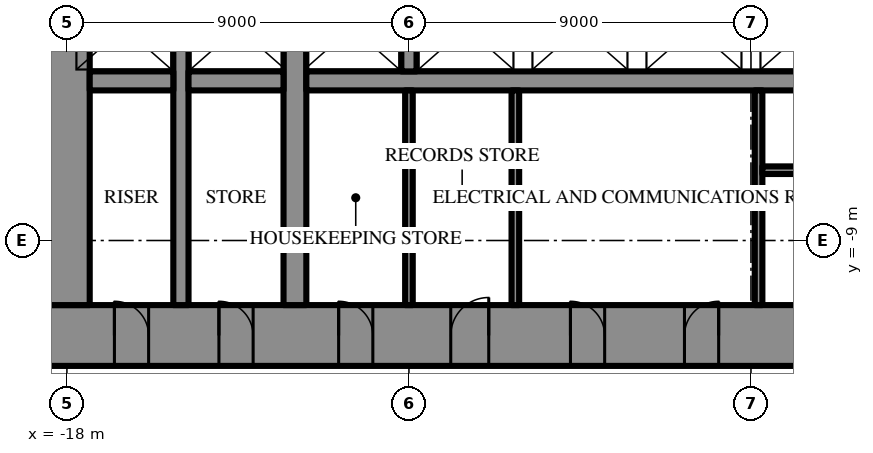
"""IFC4 building model, lengths in metres.
Left out: names, types, materials, properties, quantities, classifications, styles, units other than length and angle.
Written with IfcOpenShell. Run it as: python <this file> out.ifc"""

import sys

from ifc_helpers import new_model, si_unit, direction, frame, frame_2d, origin, place, context, subcontext, project, spatial, rectangle, extrude, element, fill, save


model = new_model("IFC4")
c1 = context("Model", 3, precision=1e-05, world=origin(), true_north=direction((0.0, 1.0)))
c2 = subcontext(c1, "Body", "Model", "MODEL_VIEW")
j1 = project(units=[si_unit("LENGTHUNIT", "METRE"), si_unit("PLANEANGLEUNIT", "RADIAN")], contexts=[c1])
p1 = place(None, origin())
s1 = spatial("IfcSite", under=j1, at=p1, CompositionType="ELEMENT")
p2 = place(p1, origin())
s2 = spatial("IfcBuilding", under=s1, at=p2, CompositionType="ELEMENT")
p3 = place(p2, frame((0.0, 0.0, 44.5)))
s3 = spatial("IfcBuildingStorey", under=s2, at=p3, CompositionType="ELEMENT", Elevation=44.5)
p4 = place(p3, frame((18.6, -11.5, 0.0), z_axis=(0.0, 0.0, 1.0), x_axis=(-1.0, 0.0, 0.0)))
e1 = element("IfcWall", 1, at=p4, inside=s3, PredefinedType="SHEAR", context=c2, shape_type="SweptSolid", body=[
    extrude(rectangle(XDim=37.2, YDim=1.6, at=frame_2d((18.6, 0.0))), origin(), (0.0, 0.0, 1.0), 4.2),
])
p5 = place(p4, frame((19.45, 0.0, 0.0)))
e2 = element("IfcOpeningElement", 2, at=p5, cuts=e1, PredefinedType="OPENING", context=c2, shape_type="SweptSolid", body=[
    extrude(rectangle(XDim=0.9, YDim=2.2, at=frame_2d((0.45, 1.1))), frame((0.0, 0.81, 0.0), z_axis=(0.0, -1.0, 0.0), x_axis=(1.0, 0.0, 0.0)), (0.0, 0.0, 1.0), 1.62),
])
p6 = place(p4, frame((22.45, 0.0, 0.0)))
e3 = element("IfcOpeningElement", 3, at=p6, cuts=e1, PredefinedType="OPENING", context=c2, shape_type="SweptSolid", body=[
    extrude(rectangle(XDim=0.9, YDim=2.2, at=frame_2d((0.45, 1.1))), frame((0.0, 0.81, 0.0), z_axis=(0.0, -1.0, 0.0), x_axis=(1.0, 0.0, 0.0)), (0.0, 0.0, 1.0), 1.62),
])
p7 = place(p4, frame((25.5, 0.0, 0.0)))
e4 = element("IfcOpeningElement", 4, at=p7, cuts=e1, PredefinedType="OPENING", context=c2, shape_type="SweptSolid", body=[
    extrude(rectangle(XDim=1.0, YDim=2.2, at=frame_2d((0.5, 1.1))), frame((0.0, 0.81, 0.0), z_axis=(0.0, -1.0, 0.0), x_axis=(1.0, 0.0, 0.0)), (0.0, 0.0, 1.0), 1.62),
])
p8 = place(p4, frame((1.85, 0.0, 0.0)))
e5 = element("IfcOpeningElement", 5, at=p8, cuts=e1, PredefinedType="OPENING", context=c2, shape_type="SweptSolid", body=[
    extrude(rectangle(XDim=0.9, YDim=2.2, at=frame_2d((0.45, 1.1))), frame((0.0, 0.81, 0.0), z_axis=(0.0, -1.0, 0.0), x_axis=(1.0, 0.0, 0.0)), (0.0, 0.0, 1.0), 1.62),
])
p9 = place(p4, frame((4.6, 0.0, 0.0)))
e6 = element("IfcOpeningElement", 6, at=p9, cuts=e1, PredefinedType="OPENING", context=c2, shape_type="SweptSolid", body=[
    extrude(rectangle(XDim=0.9, YDim=2.2, at=frame_2d((0.45, 1.1))), frame((0.0, 0.81, 0.0), z_axis=(0.0, -1.0, 0.0), x_axis=(1.0, 0.0, 0.0)), (0.0, 0.0, 1.0), 1.62),
])
p10 = place(p4, frame((7.75, 0.0, 0.0)))
e7 = element("IfcOpeningElement", 7, at=p10, cuts=e1, PredefinedType="OPENING", context=c2, shape_type="SweptSolid", body=[
    extrude(rectangle(XDim=0.9, YDim=2.2, at=frame_2d((0.45, 1.1))), frame((0.0, 0.81, 0.0), z_axis=(0.0, -1.0, 0.0), x_axis=(1.0, 0.0, 0.0)), (0.0, 0.0, 1.0), 1.62),
])
p11 = place(p4, frame((28.55, 0.0, 0.0)))
e8 = element("IfcOpeningElement", 8, at=p11, cuts=e1, PredefinedType="OPENING", context=c2, shape_type="SweptSolid", body=[
    extrude(rectangle(XDim=0.9, YDim=2.2, at=frame_2d((0.45, 1.1))), frame((0.0, 0.81, 0.0), z_axis=(0.0, -1.0, 0.0), x_axis=(1.0, 0.0, 0.0)), (0.0, 0.0, 1.0), 1.62),
])
p12 = place(p4, frame((31.7, 0.0, 0.0)))
e9 = element("IfcOpeningElement", 9, at=p12, cuts=e1, PredefinedType="OPENING", context=c2, shape_type="SweptSolid", body=[
    extrude(rectangle(XDim=0.9, YDim=2.2, at=frame_2d((0.45, 1.1))), frame((0.0, 0.81, 0.0), z_axis=(0.0, -1.0, 0.0), x_axis=(1.0, 0.0, 0.0)), (0.0, 0.0, 1.0), 1.62),
])
p13 = place(p4, frame((34.45, 0.0, 0.0)))
e10 = element("IfcOpeningElement", 10, at=p13, cuts=e1, PredefinedType="OPENING", context=c2, shape_type="SweptSolid", body=[
    extrude(rectangle(XDim=0.9, YDim=2.2, at=frame_2d((0.45, 1.1))), frame((0.0, 0.81, 0.0), z_axis=(0.0, -1.0, 0.0), x_axis=(1.0, 0.0, 0.0)), (0.0, 0.0, 1.0), 1.62),
])
p14 = place(p3, frame((-18.0, 10.7, 0.0), z_axis=(0.0, 0.0, 1.0), x_axis=(0.0, -1.0, 0.0)))
e11 = element("IfcWall", 11, at=p14, inside=s3, PredefinedType="SHEAR", context=c2, shape_type="SweptSolid", body=[
    extrude(rectangle(XDim=21.4, YDim=1.2, at=frame_2d((10.7, 0.0))), origin(), (0.0, 0.0, 1.0), 4.2),
])
p15 = place(p14, frame((9.8, 0.0, 0.0)))
e12 = element("IfcOpeningElement", 12, at=p15, cuts=e11, PredefinedType="OPENING", context=c2, shape_type="SweptSolid", body=[
    extrude(rectangle(XDim=1.8, YDim=2.4, at=frame_2d((0.9, 1.2))), frame((0.0, 0.61, 0.0), z_axis=(0.0, -1.0, 0.0), x_axis=(1.0, 0.0, 0.0)), (0.0, 0.0, 1.0), 1.22),
])
p16 = place(p3, frame((-12.0, -10.7, 0.0), z_axis=(0.0, 0.0, 1.0), x_axis=(0.0, 1.0, 0.0)))
e13 = element("IfcWall", 13, at=p16, inside=s3, PredefinedType="SHEAR", context=c2, shape_type="SweptSolid", body=[
    extrude(rectangle(XDim=21.4, YDim=0.6, at=frame_2d((10.7, 0.0))), origin(), (0.0, 0.0, 1.0), 4.2),
])
p17 = place(p16, frame((9.8, 0.0, 0.0)))
e14 = element("IfcOpeningElement", 14, at=p17, cuts=e13, PredefinedType="OPENING", context=c2, shape_type="SweptSolid", body=[
    extrude(rectangle(XDim=1.8, YDim=2.4, at=frame_2d((0.9, 1.2))), frame((0.0, 0.31, 0.0), z_axis=(0.0, -1.0, 0.0), x_axis=(1.0, 0.0, 0.0)), (0.0, 0.0, 1.0), 0.62),
])
p18 = place(p3, frame((-15.0, -10.7, 0.0), z_axis=(0.0, 0.0, 1.0), x_axis=(0.0, 1.0, 0.0)))
e15 = element("IfcWall", 15, at=p18, inside=s3, PredefinedType="SHEAR", context=c2, shape_type="SweptSolid", body=[
    extrude(rectangle(XDim=21.4, YDim=0.4, at=frame_2d((10.7, 0.0))), origin(), (0.0, 0.0, 1.0), 4.2),
])
p19 = place(p18, frame((9.8, 0.0, 0.0)))
e16 = element("IfcOpeningElement", 16, at=p19, cuts=e15, PredefinedType="OPENING", context=c2, shape_type="SweptSolid", body=[
    extrude(rectangle(XDim=1.8, YDim=2.4, at=frame_2d((0.9, 1.2))), frame((0.0, 0.21, 0.0), z_axis=(0.0, -1.0, 0.0), x_axis=(1.0, 0.0, 0.0)), (0.0, 0.0, 1.0), 0.42),
])
p20 = place(p3, frame((11.7, -4.8, 0.0), z_axis=(0.0, 0.0, 1.0), x_axis=(-1.0, 0.0, 0.0)))
e17 = element("IfcWall", 17, at=p20, inside=s3, PredefinedType="SHEAR", context=c2, shape_type="SweptSolid", body=[
    extrude(rectangle(XDim=23.4, YDim=0.5, at=frame_2d((11.7, 0.0))), origin(), (0.0, 0.0, 1.0), 4.2),
])
p21 = place(p20, frame((6.6, 0.0, 0.0)))
e18 = element("IfcOpeningElement", 18, at=p21, cuts=e17, PredefinedType="OPENING", context=c2, shape_type="SweptSolid", body=[
    extrude(rectangle(XDim=1.2, YDim=2.2, at=frame_2d((0.6, 1.1))), frame((0.0, 0.26, 0.0), z_axis=(0.0, -1.0, 0.0), x_axis=(1.0, 0.0, 0.0)), (0.0, 0.0, 1.0), 0.52),
])
p22 = place(p20, frame((3.6, 0.0, 0.0)))
e19 = element("IfcOpeningElement", 19, at=p22, cuts=e17, PredefinedType="OPENING", context=c2, shape_type="SweptSolid", body=[
    extrude(rectangle(XDim=1.2, YDim=2.2, at=frame_2d((0.6, 1.1))), frame((0.0, 0.26, 0.0), z_axis=(0.0, -1.0, 0.0), x_axis=(1.0, 0.0, 0.0)), (0.0, 0.0, 1.0), 0.52),
])
p23 = place(p3, frame((-12.3, -4.8, 0.0), z_axis=(0.0, 0.0, 1.0), x_axis=(-1.0, 0.0, 0.0)))
e20 = element("IfcWall", 20, at=p23, inside=s3, PredefinedType="SHEAR", context=c2, shape_type="SweptSolid", body=[
    extrude(rectangle(XDim=2.5, YDim=0.5, at=frame_2d((1.25, 0.0))), origin(), (0.0, 0.0, 1.0), 4.2),
])
p24 = place(p3, frame((-15.2, -4.8, 0.0), z_axis=(0.0, 0.0, 1.0), x_axis=(-1.0, 0.0, 0.0)))
e21 = element("IfcWall", 21, at=p24, inside=s3, PredefinedType="SHEAR", context=c2, shape_type="SweptSolid", body=[
    extrude(rectangle(XDim=2.2, YDim=0.5, at=frame_2d((1.1, 0.0))), origin(), (0.0, 0.0, 1.0), 4.2),
])
p25 = place(p3, frame((-9.0, -2.25, 0.0), z_axis=(0.0, 0.0, 1.0), x_axis=(0.0, -1.0, 0.0)))
e22 = element("IfcWall", 22, at=p25, inside=s3, PredefinedType="SHEAR", context=c2, shape_type="SweptSolid", body=[
    extrude(rectangle(XDim=2.3, YDim=0.4, at=frame_2d((1.15, 0.0))), origin(), (0.0, 0.0, 1.0), 4.2),
])
p26 = place(p3, frame((0.2, -5.05, 0.0), z_axis=(0.0, 0.0, 1.0), x_axis=(0.0, -1.0, 0.0)))
e23 = element("IfcWall", 23, at=p26, inside=s3, PredefinedType="SHEAR", context=c2, shape_type="SweptSolid", body=[
    extrude(rectangle(XDim=5.65, YDim=0.2, at=frame_2d((2.825, 0.0))), origin(), (0.0, 0.0, 1.0), 4.2),
])
p27 = place(p3, frame((8.9, -7.15, 0.0), z_axis=(0.0, 0.0, 1.0), x_axis=(-1.0, 0.0, 0.0)))
e24 = element("IfcWall", 24, at=p27, inside=s3, PredefinedType="SHEAR", context=c2, shape_type="SweptSolid", body=[
    extrude(rectangle(XDim=8.6, YDim=0.2, at=frame_2d((4.3, 0.0))), origin(), (0.0, 0.0, 1.0), 4.2),
])
p28 = place(p27, frame((0.3, 0.0, 0.0)))
e25 = element("IfcOpeningElement", 25, at=p28, cuts=e24, PredefinedType="OPENING", context=c2, shape_type="SweptSolid", body=[
    extrude(rectangle(XDim=1.0, YDim=2.2, at=frame_2d((0.5, 1.1))), frame((0.0, 0.11, 0.0), z_axis=(0.0, -1.0, 0.0), x_axis=(1.0, 0.0, 0.0)), (0.0, 0.0, 1.0), 0.22),
])
for number, where, z_axis, x_axis in (
    (26, (-9.0, -5.05, 0.0), (0.0, 0.0, 1.0), (0.0, -1.0, 0.0)),
    (27, (-6.2, -5.05, 0.0), (0.0, 0.0, 1.0), (0.0, -1.0, 0.0)),
):
    element("IfcWall", number, at=place(p3, frame(where, z_axis=z_axis, x_axis=x_axis)), inside=s3, PredefinedType="PARTITIONING", context=c2, shape_type="SweptSolid", body=[
        extrude(rectangle(XDim=5.65, YDim=0.2, at=frame_2d((2.825, 0.0))), origin(), (0.0, 0.0, 1.0), 4.0),
    ])
p29 = place(p5, frame((0.9, 0.0, 0.0), z_axis=(0.0, 0.0, 1.0), x_axis=(-1.0, 0.0, 0.0)))
e28 = element("IfcDoor", 28, at=p29, inside=s3, OperationType="SINGLE_SWING_LEFT", PredefinedType="DOOR", context=c2, shape_type="SweptSolid", body=[
    extrude(rectangle(XDim=0.9, YDim=2.2, at=frame_2d((0.45, 1.1))), frame((0.0, 0.025, 0.0), z_axis=(0.0, -1.0, 0.0), x_axis=(1.0, 0.0, 0.0)), (0.0, 0.0, 1.0), 0.05),
])
fill(e2, e28)
p30 = place(p6, frame((0.9, 0.0, 0.0), z_axis=(0.0, 0.0, 1.0), x_axis=(-1.0, 0.0, 0.0)))
e29 = element("IfcDoor", 29, at=p30, inside=s3, OperationType="SINGLE_SWING_RIGHT", PredefinedType="DOOR", context=c2, shape_type="SweptSolid", body=[
    extrude(rectangle(XDim=0.9, YDim=2.2, at=frame_2d((0.45, 1.1))), frame((0.0, 0.025, 0.0), z_axis=(0.0, -1.0, 0.0), x_axis=(1.0, 0.0, 0.0)), (0.0, 0.0, 1.0), 0.05),
])
fill(e3, e29)
p31 = place(p7, frame((1.0, 0.0, 0.0), z_axis=(0.0, 0.0, 1.0), x_axis=(-1.0, 0.0, 0.0)))
e30 = element("IfcDoor", 30, at=p31, inside=s3, OperationType="SINGLE_SWING_LEFT", PredefinedType="DOOR", context=c2, shape_type="SweptSolid", body=[
    extrude(rectangle(XDim=1.0, YDim=2.2, at=frame_2d((0.5, 1.1))), frame((0.0, 0.025, 0.0), z_axis=(0.0, -1.0, 0.0), x_axis=(1.0, 0.0, 0.0)), (0.0, 0.0, 1.0), 0.05),
])
fill(e4, e30)
p32 = place(p11, frame((0.9, 0.0, 0.0), z_axis=(0.0, 0.0, 1.0), x_axis=(-1.0, 0.0, 0.0)))
e31 = element("IfcDoor", 31, at=p32, inside=s3, OperationType="SINGLE_SWING_RIGHT", PredefinedType="DOOR", context=c2, shape_type="SweptSolid", body=[
    extrude(rectangle(XDim=0.9, YDim=2.2, at=frame_2d((0.45, 1.1))), frame((0.0, 0.025, 0.0), z_axis=(0.0, -1.0, 0.0), x_axis=(1.0, 0.0, 0.0)), (0.0, 0.0, 1.0), 0.05),
])
fill(e8, e31)
p33 = place(p12, frame((0.9, 0.0, 0.0), z_axis=(0.0, 0.0, 1.0), x_axis=(-1.0, 0.0, 0.0)))
e32 = element("IfcDoor", 32, at=p33, inside=s3, OperationType="SINGLE_SWING_RIGHT", PredefinedType="DOOR", context=c2, shape_type="SweptSolid", body=[
    extrude(rectangle(XDim=0.9, YDim=2.2, at=frame_2d((0.45, 1.1))), frame((0.0, 0.025, 0.0), z_axis=(0.0, -1.0, 0.0), x_axis=(1.0, 0.0, 0.0)), (0.0, 0.0, 1.0), 0.05),
])
fill(e9, e32)
p34 = place(p13, frame((0.9, 0.0, 0.0), z_axis=(0.0, 0.0, 1.0), x_axis=(-1.0, 0.0, 0.0)))
e33 = element("IfcDoor", 33, at=p34, inside=s3, OperationType="SINGLE_SWING_RIGHT", PredefinedType="DOOR", context=c2, shape_type="SweptSolid", body=[
    extrude(rectangle(XDim=0.9, YDim=2.2, at=frame_2d((0.45, 1.1))), frame((0.0, 0.025, 0.0), z_axis=(0.0, -1.0, 0.0), x_axis=(1.0, 0.0, 0.0)), (0.0, 0.0, 1.0), 0.05),
])
fill(e10, e33)
save(model, sys.argv[1])
